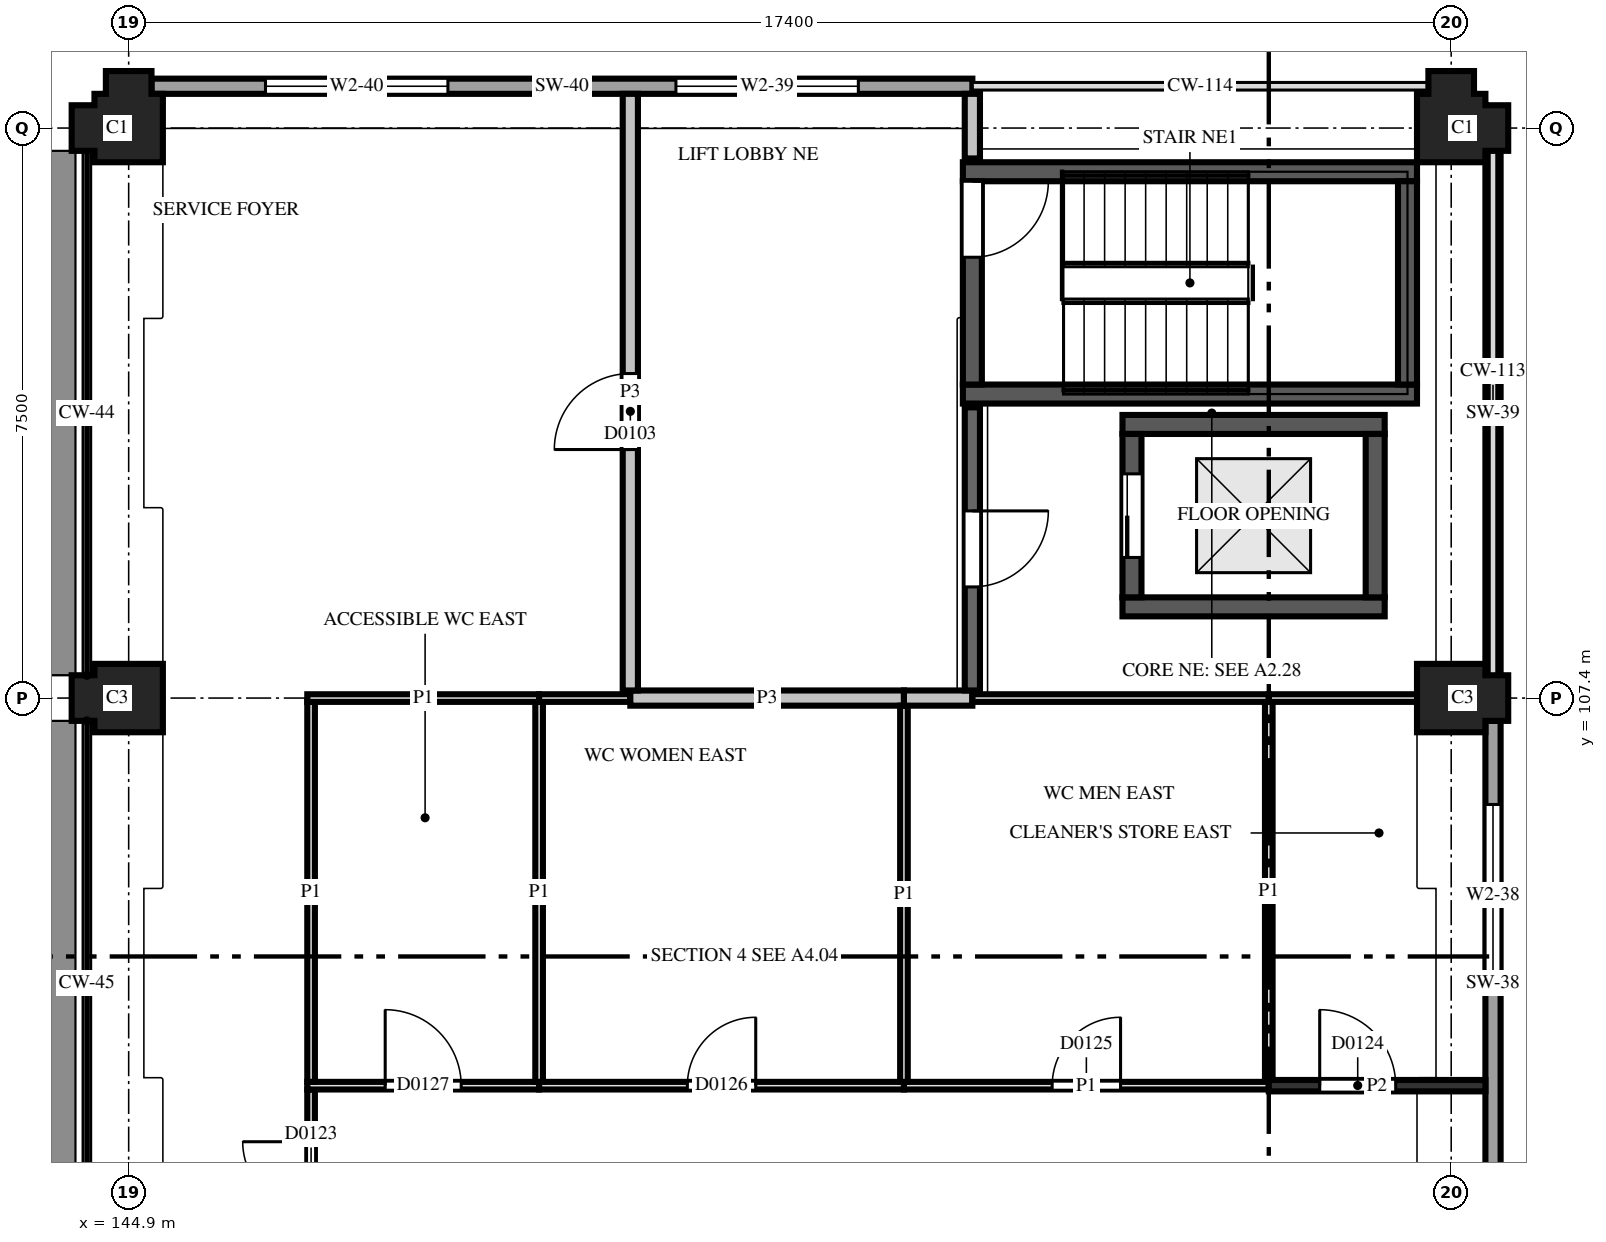
"""IFC4 building model, lengths in metres.
Left out: names, types, materials, properties, quantities, classifications, styles, units other than length and angle.
Written with IfcOpenShell. Run it as: python <this file> out.ifc"""

import sys

from ifc_helpers import new_model, si_unit, direction, frame, frame_2d, origin, place, context, subcontext, project, spatial, polyline, rectangle, outline, extrude, element, fill, save


model = new_model("IFC4")
c1 = context("Model", 3, precision=1e-05, world=origin(), true_north=direction((0.0, 1.0)))
c2 = subcontext(c1, "Body", "Model", "MODEL_VIEW")
j1 = project(units=[si_unit("LENGTHUNIT", "METRE"), si_unit("PLANEANGLEUNIT", "RADIAN")], contexts=[c1])
p1 = place(None, origin())
s1 = spatial("IfcSite", under=j1, at=p1, CompositionType="ELEMENT")
p2 = place(p1, origin())
s2 = spatial("IfcBuilding", under=s1, at=p2, CompositionType="ELEMENT")
p3 = place(p2, frame((0.0, 0.0, 4.5)))
s3 = spatial("IfcBuildingStorey", under=s2, at=p3, CompositionType="ELEMENT", Elevation=4.5)
for number, where, z_axis, x_axis in (
    (1, (144.9, 107.4, 0.0), (0.0, 0.0, 1.0), (-1.0, 0.0, 0.0)),
    (2, (162.3, 107.4, 0.0), (0.0, 0.0, 1.0), (1.0, 0.0, 0.0)),
):
    element("IfcColumn", number, at=place(p3, frame(where, z_axis=z_axis, x_axis=x_axis)), inside=s3, PredefinedType="COLUMN", context=c2, shape_type="SweptSolid", body=[
        extrude(outline(polyline([(-0.45, -0.45), (0.45, -0.45), (0.45, -0.3), (0.75, -0.3), (0.75, 0.3), (0.45, 0.3), (0.45, 0.45), (-0.45, 0.45), (-0.45, -0.45)])), origin(), (0.0, 0.0, 1.0), 3.7),
    ])
for number, where, z_axis, x_axis in (
    (3, (144.9, 114.9, 0.0), (0.0, 0.0, 1.0), (0.0, 1.0, 0.0)),
    (4, (162.3, 114.9, 0.0), (0.0, 0.0, 1.0), (1.0, 0.0, 0.0)),
):
    element("IfcColumn", number, at=place(p3, frame(where, z_axis=z_axis, x_axis=x_axis)), inside=s3, PredefinedType="COLUMN", context=c2, shape_type="SweptSolid", body=[
        extrude(outline(polyline([(-0.45, -0.45), (0.45, -0.45), (0.45, -0.3), (0.75, -0.3), (0.75, 0.3), (0.45, 0.3), (0.45, 0.45), (0.3, 0.45), (0.3, 0.75), (-0.3, 0.75), (-0.3, 0.45), (-0.45, 0.45), (-0.45, -0.45)])), origin(), (0.0, 0.0, 1.0), 3.7),
    ])
for number, where, z_axis, x_axis in (
    (5, (157.975, 108.6, 0.0), (0.0, 0.0, 1.0), (1.0, 0.0, 0.0)),
    (6, (157.975, 111.0, 0.0), (0.0, 0.0, 1.0), (1.0, 0.0, 0.0)),
):
    element("IfcWall", number, at=place(p3, frame(where, z_axis=z_axis, x_axis=x_axis)), inside=s3, PredefinedType="SHEAR", context=c2, shape_type="SweptSolid", body=[
        extrude(rectangle(XDim=3.45, YDim=0.25, at=frame_2d((1.725, 0.0))), origin(), (0.0, 0.0, 1.0), 3.7),
    ])
for number, where, z_axis, x_axis in (
    (7, (155.875, 111.4, 0.0), (0.0, 0.0, 1.0), (1.0, 0.0, 0.0)),
    (8, (155.875, 114.325, 0.0), (0.0, 0.0, 1.0), (1.0, 0.0, 0.0)),
):
    element("IfcWall", number, at=place(p3, frame(where, z_axis=z_axis, x_axis=x_axis)), inside=s3, PredefinedType="SHEAR", context=c2, shape_type="SweptSolid", body=[
        extrude(rectangle(XDim=5.975, YDim=0.25, at=frame_2d((2.988, 0.0))), origin(), (0.0, 0.0, 1.0), 3.7),
    ])
p4 = place(p3, frame((156.0, 111.525, 0.0), z_axis=(0.0, 0.0, 1.0), x_axis=(0.0, 1.0, 0.0)))
e9 = element("IfcWall", 9, at=p4, inside=s3, PredefinedType="SHEAR", context=c2, shape_type="SweptSolid", body=[
    extrude(rectangle(XDim=2.675, YDim=0.25, at=frame_2d((1.337, 0.0))), origin(), (0.0, 0.0, 1.0), 3.7),
])
p5 = place(p4, frame((1.675, 0.0, 0.0)))
e10 = element("IfcOpeningElement", 10, at=p5, cuts=e9, PredefinedType="OPENING", context=c2, shape_type="SweptSolid", body=[
    extrude(rectangle(XDim=1.0, YDim=2.1, at=frame_2d((0.5, 1.05))), frame((0.0, 0.135, 0.0), z_axis=(0.0, -1.0, 0.0), x_axis=(1.0, 0.0, 0.0)), (0.0, 0.0, 1.0), 0.27),
])
p6 = place(p3, frame((158.1, 108.725, 0.0), z_axis=(0.0, 0.0, 1.0), x_axis=(0.0, 1.0, 0.0)))
e11 = element("IfcWall", 11, at=p6, inside=s3, PredefinedType="SHEAR", context=c2, shape_type="SweptSolid", body=[
    extrude(rectangle(XDim=2.15, YDim=0.25, at=frame_2d((1.075, 0.0))), origin(), (0.0, 0.0, 1.0), 3.7),
])
p7 = place(p6, frame((0.525, 0.0, 0.0)))
e12 = element("IfcOpeningElement", 12, at=p7, cuts=e11, PredefinedType="OPENING", context=c2, shape_type="SweptSolid", body=[
    extrude(rectangle(XDim=1.1, YDim=2.1, at=frame_2d((0.55, 1.05))), frame((0.0, 0.135, 0.0), z_axis=(0.0, -1.0, 0.0), x_axis=(1.0, 0.0, 0.0)), (0.0, 0.0, 1.0), 0.27),
])
p8 = place(p3, frame((161.3, 108.725, 0.0), z_axis=(0.0, 0.0, 1.0), x_axis=(0.0, 1.0, 0.0)))
e13 = element("IfcWall", 13, at=p8, inside=s3, PredefinedType="SHEAR", context=c2, shape_type="SweptSolid", body=[
    extrude(rectangle(XDim=2.15, YDim=0.25, at=frame_2d((1.075, 0.0))), origin(), (0.0, 0.0, 1.0), 3.7),
])
p9 = place(p3, frame((161.725, 111.525, 0.0), z_axis=(0.0, 0.0, 1.0), x_axis=(0.0, 1.0, 0.0)))
e14 = element("IfcWall", 14, at=p9, inside=s3, PredefinedType="SHEAR", context=c2, shape_type="SweptSolid", body=[
    extrude(rectangle(XDim=2.675, YDim=0.25, at=frame_2d((1.337, 0.0))), origin(), (0.0, 0.0, 1.0), 3.7),
])
p10 = place(p3, frame((162.85, 100.2, 0.0), z_axis=(0.0, 0.0, 1.0), x_axis=(0.0, 1.0, 0.0)))
e15 = element("IfcWall", 15, at=p10, inside=s3, PredefinedType="SOLIDWALL", context=c2, shape_type="SweptSolid", body=[
    extrude(rectangle(XDim=6.9, YDim=0.2, at=frame_2d((3.45, 0.0))), origin(), (0.0, 0.0, 1.0), 2.3),
])
p11 = place(p10, frame((3.4, 0.0, 0.55)))
e16 = element("IfcOpeningElement", 16, at=p11, cuts=e15, PredefinedType="OPENING", context=c2, shape_type="SweptSolid", body=[
    extrude(rectangle(XDim=2.4, YDim=1.0, at=frame_2d((1.2, 0.5))), frame((0.0, 0.11, 0.0), z_axis=(0.0, -1.0, 0.0), x_axis=(1.0, 0.0, 0.0)), (0.0, 0.0, 1.0), 0.22),
])
p12 = place(p3, frame((162.85, 107.7, 0.0), z_axis=(0.0, 0.0, 1.0), x_axis=(0.0, 1.0, 0.0)))
e17 = element("IfcWall", 17, at=p12, inside=s3, PredefinedType="SOLIDWALL", context=c2, shape_type="SweptSolid", body=[
    extrude(rectangle(XDim=6.9, YDim=0.2, at=frame_2d((3.45, 0.0))), origin(), (0.0, 0.0, 1.0), 2.3),
])
p13 = place(p3, frame((156.0, 115.45, 0.0), z_axis=(0.0, 0.0, 1.0), x_axis=(-1.0, 0.0, 0.0)))
e18 = element("IfcWall", 18, at=p13, inside=s3, PredefinedType="SOLIDWALL", context=c2, shape_type="SweptSolid", body=[
    extrude(rectangle(XDim=10.8, YDim=0.2, at=frame_2d((5.4, 0.0))), origin(), (0.0, 0.0, 1.0), 1.7),
])
p14 = place(p13, frame((1.5, 0.0, 0.55)))
e19 = element("IfcOpeningElement", 19, at=p14, cuts=e18, PredefinedType="OPENING", context=c2, shape_type="SweptSolid", body=[
    extrude(rectangle(XDim=2.4, YDim=1.0, at=frame_2d((1.2, 0.5))), frame((0.0, 0.11, 0.0), z_axis=(0.0, -1.0, 0.0), x_axis=(1.0, 0.0, 0.0)), (0.0, 0.0, 1.0), 0.22),
])
p15 = place(p13, frame((6.9, 0.0, 0.55)))
e20 = element("IfcOpeningElement", 20, at=p15, cuts=e18, PredefinedType="OPENING", context=c2, shape_type="SweptSolid", body=[
    extrude(rectangle(XDim=2.4, YDim=1.0, at=frame_2d((1.2, 0.5))), frame((0.0, 0.11, 0.0), z_axis=(0.0, -1.0, 0.0), x_axis=(1.0, 0.0, 0.0)), (0.0, 0.0, 1.0), 0.22),
])
p16 = place(p3, frame((147.3, 102.25, 0.0), z_axis=(0.0, 0.0, 1.0), x_axis=(0.0, -1.0, 0.0)))
e21 = element("IfcWall", 21, at=p16, inside=s3, PredefinedType="PARTITIONING", context=c2, shape_type="SweptSolid", body=[
    extrude(rectangle(XDim=2.275, YDim=0.1, at=frame_2d((1.137, 0.0))), origin(), (0.0, 0.0, 1.0), 2.88),
])
p17 = place(p16, frame((0.688, 0.0, 0.0)))
e22 = element("IfcOpeningElement", 22, at=p17, cuts=e21, PredefinedType="OPENING", context=c2, shape_type="SweptSolid", body=[
    extrude(rectangle(XDim=0.9, YDim=2.1, at=frame_2d((0.45, 1.05))), frame((0.0, 0.06, 0.0), z_axis=(0.0, -1.0, 0.0), x_axis=(1.0, 0.0, 0.0)), (0.0, 0.0, 1.0), 0.12),
])
p18 = place(p3, frame((150.3, 102.3, 0.0), z_axis=(0.0, 0.0, 1.0), x_axis=(-1.0, 0.0, 0.0)))
e23 = element("IfcWall", 23, at=p18, inside=s3, PredefinedType="PARTITIONING", context=c2, shape_type="SweptSolid", body=[
    extrude(rectangle(XDim=3.05, YDim=0.1, at=frame_2d((1.525, 0.0))), origin(), (0.0, 0.0, 1.0), 2.88),
])
p19 = place(p18, frame((1.025, 0.0, 0.0)))
e24 = element("IfcOpeningElement", 24, at=p19, cuts=e23, PredefinedType="OPENING", context=c2, shape_type="SweptSolid", body=[
    extrude(rectangle(XDim=1.0, YDim=2.1, at=frame_2d((0.5, 1.05))), frame((0.0, 0.06, 0.0), z_axis=(0.0, -1.0, 0.0), x_axis=(1.0, 0.0, 0.0)), (0.0, 0.0, 1.0), 0.12),
])
p20 = place(p3, frame((155.1, 102.3, 0.0), z_axis=(0.0, 0.0, 1.0), x_axis=(-1.0, 0.0, 0.0)))
e25 = element("IfcWall", 25, at=p20, inside=s3, PredefinedType="PARTITIONING", context=c2, shape_type="SweptSolid", body=[
    extrude(rectangle(XDim=4.8, YDim=0.1, at=frame_2d((2.4, 0.0))), origin(), (0.0, 0.0, 1.0), 2.88),
])
p21 = place(p20, frame((1.95, 0.0, 0.0)))
e26 = element("IfcOpeningElement", 26, at=p21, cuts=e25, PredefinedType="OPENING", context=c2, shape_type="SweptSolid", body=[
    extrude(rectangle(XDim=0.9, YDim=2.1, at=frame_2d((0.45, 1.05))), frame((0.0, 0.06, 0.0), z_axis=(0.0, -1.0, 0.0), x_axis=(1.0, 0.0, 0.0)), (0.0, 0.0, 1.0), 0.12),
])
p22 = place(p3, frame((159.9, 102.3, 0.0), z_axis=(0.0, 0.0, 1.0), x_axis=(-1.0, 0.0, 0.0)))
e27 = element("IfcWall", 27, at=p22, inside=s3, PredefinedType="PARTITIONING", context=c2, shape_type="SweptSolid", body=[
    extrude(rectangle(XDim=4.8, YDim=0.1, at=frame_2d((2.4, 0.0))), origin(), (0.0, 0.0, 1.0), 2.88),
])
p23 = place(p22, frame((1.95, 0.0, 0.0)))
e28 = element("IfcOpeningElement", 28, at=p23, cuts=e27, PredefinedType="OPENING", context=c2, shape_type="SweptSolid", body=[
    extrude(rectangle(XDim=0.9, YDim=2.1, at=frame_2d((0.45, 1.05))), frame((0.0, 0.06, 0.0), z_axis=(0.0, -1.0, 0.0), x_axis=(1.0, 0.0, 0.0)), (0.0, 0.0, 1.0), 0.12),
])
p24 = place(p3, frame((162.75, 102.3, 0.0), z_axis=(0.0, 0.0, 1.0), x_axis=(-1.0, 0.0, 0.0)))
e29 = element("IfcWall", 29, at=p24, inside=s3, PredefinedType="PARTITIONING", context=c2, shape_type="SweptSolid", body=[
    extrude(rectangle(XDim=2.85, YDim=0.15, at=frame_2d((1.425, 0.0))), origin(), (0.0, 0.0, 1.0), 2.88),
])
p25 = place(p24, frame((1.18, 0.0, 0.0)))
e30 = element("IfcOpeningElement", 30, at=p25, cuts=e29, PredefinedType="OPENING", context=c2, shape_type="SweptSolid", body=[
    extrude(rectangle(XDim=1.0, YDim=2.1, at=frame_2d((0.5, 1.05))), frame((0.0, 0.085, 0.0), z_axis=(0.0, -1.0, 0.0), x_axis=(1.0, 0.0, 0.0)), (0.0, 0.0, 1.0), 0.17),
])
for number, where, z_axis, x_axis in (
    (31, (147.3, 107.35, 0.0), (0.0, 0.0, 1.0), (0.0, -1.0, 0.0)),
    (32, (150.3, 107.35, 0.0), (0.0, 0.0, 1.0), (0.0, -1.0, 0.0)),
):
    element("IfcWall", number, at=place(p3, frame(where, z_axis=z_axis, x_axis=x_axis)), inside=s3, PredefinedType="PARTITIONING", context=c2, shape_type="SweptSolid", body=[
        extrude(rectangle(XDim=5.0, YDim=0.1, at=frame_2d((2.5, 0.0))), origin(), (0.0, 0.0, 1.0), 2.88),
    ])
p26 = place(p3, frame((150.3, 107.4, 0.0), z_axis=(0.0, 0.0, 1.0), x_axis=(-1.0, 0.0, 0.0)))
e33 = element("IfcWall", 33, at=p26, inside=s3, PredefinedType="PARTITIONING", context=c2, shape_type="SweptSolid", body=[
    extrude(rectangle(XDim=3.05, YDim=0.1, at=frame_2d((1.525, 0.0))), origin(), (0.0, 0.0, 1.0), 2.88),
])
p27 = place(p3, frame((151.5, 107.4, 0.0), z_axis=(0.0, 0.0, 1.0), x_axis=(-1.0, 0.0, 0.0)))
e34 = element("IfcWall", 34, at=p27, inside=s3, PredefinedType="PARTITIONING", context=c2, shape_type="SweptSolid", body=[
    extrude(rectangle(XDim=1.2, YDim=0.1, at=frame_2d((0.6, 0.0))), origin(), (0.0, 0.0, 1.0), 2.88),
])
p28 = place(p3, frame((151.5, 107.4, 0.0), z_axis=(0.0, 0.0, 1.0), x_axis=(1.0, 0.0, 0.0)))
e35 = element("IfcWall", 35, at=p28, inside=s3, PredefinedType="PARTITIONING", context=c2, shape_type="SweptSolid", body=[
    extrude(rectangle(XDim=3.6, YDim=0.2, at=frame_2d((1.8, 0.0))), origin(), (0.0, 0.0, 1.0), 2.88),
])
p29 = place(p3, frame((155.1, 107.3, 0.0), z_axis=(0.0, 0.0, 1.0), x_axis=(0.0, -1.0, 0.0)))
e36 = element("IfcWall", 36, at=p29, inside=s3, PredefinedType="PARTITIONING", context=c2, shape_type="SweptSolid", body=[
    extrude(rectangle(XDim=4.95, YDim=0.1, at=frame_2d((2.475, 0.0))), origin(), (0.0, 0.0, 1.0), 2.88),
])
p30 = place(p3, frame((155.1, 107.4, 0.0), z_axis=(0.0, 0.0, 1.0), x_axis=(1.0, 0.0, 0.0)))
e37 = element("IfcWall", 37, at=p30, inside=s3, PredefinedType="PARTITIONING", context=c2, shape_type="SweptSolid", body=[
    extrude(rectangle(XDim=0.9, YDim=0.2, at=frame_2d((0.45, 0.0))), origin(), (0.0, 0.0, 1.0), 2.88),
])
p31 = place(p3, frame((156.0, 107.5, 0.0), z_axis=(0.0, 0.0, 1.0), x_axis=(0.0, 1.0, 0.0)))
e38 = element("IfcWall", 38, at=p31, inside=s3, PredefinedType="PARTITIONING", context=c2, shape_type="SweptSolid", body=[
    extrude(rectangle(XDim=3.725, YDim=0.2, at=frame_2d((1.863, 0.0))), origin(), (0.0, 0.0, 1.0), 2.88),
])
p32 = place(p31, frame((1.363, 0.0, 0.0)))
e39 = element("IfcOpeningElement", 39, at=p32, cuts=e38, PredefinedType="OPENING", context=c2, shape_type="SweptSolid", body=[
    extrude(rectangle(XDim=1.0, YDim=2.1, at=frame_2d((0.5, 1.05))), frame((0.0, 0.11, 0.0), z_axis=(0.0, -1.0, 0.0), x_axis=(1.0, 0.0, 0.0)), (0.0, 0.0, 1.0), 0.22),
])
p33 = place(p3, frame((159.9, 107.35, 0.0), z_axis=(0.0, 0.0, 1.0), x_axis=(0.0, -1.0, 0.0)))
e40 = element("IfcWall", 40, at=p33, inside=s3, PredefinedType="PARTITIONING", context=c2, shape_type="SweptSolid", body=[
    extrude(rectangle(XDim=4.975, YDim=0.1, at=frame_2d((2.488, 0.0))), origin(), (0.0, 0.0, 1.0), 2.88),
])
p34 = place(p3, frame((159.9, 107.4, 0.0), z_axis=(0.0, 0.0, 1.0), x_axis=(-1.0, 0.0, 0.0)))
e41 = element("IfcWall", 41, at=p34, inside=s3, PredefinedType="PARTITIONING", context=c2, shape_type="SweptSolid", body=[
    extrude(rectangle(XDim=3.9, YDim=0.1, at=frame_2d((1.95, 0.0))), origin(), (0.0, 0.0, 1.0), 2.88),
])
p35 = place(p3, frame((162.24, 107.4, 0.0), z_axis=(0.0, 0.0, 1.0), x_axis=(-1.0, 0.0, 0.0)))
e42 = element("IfcWall", 42, at=p35, inside=s3, PredefinedType="PARTITIONING", context=c2, shape_type="SweptSolid", body=[
    extrude(rectangle(XDim=2.34, YDim=0.1, at=frame_2d((1.17, 0.0))), origin(), (0.0, 0.0, 1.0), 2.88),
])
p36 = place(p3, frame((156.0, 114.5, 0.0), z_axis=(0.0, 0.0, 1.0), x_axis=(0.0, 1.0, 0.0)))
e43 = element("IfcWall", 43, at=p36, inside=s3, PredefinedType="PARTITIONING", context=c2, shape_type="SweptSolid", body=[
    extrude(rectangle(XDim=0.85, YDim=0.2, at=frame_2d((0.425, 0.0))), origin(), (0.0, 0.0, 1.0), 2.88),
])
p37 = place(p3, frame((151.5, 115.35, 0.0), z_axis=(0.0, 0.0, 1.0), x_axis=(0.0, -1.0, 0.0)))
e44 = element("IfcWall", 44, at=p37, inside=s3, PredefinedType="PARTITIONING", context=c2, shape_type="SweptSolid", body=[
    extrude(rectangle(XDim=7.85, YDim=0.2, at=frame_2d((3.925, 0.0))), origin(), (0.0, 0.0, 1.0), 2.88),
])
p38 = place(p37, frame((3.68, 0.0, 0.0)))
e45 = element("IfcOpeningElement", 45, at=p38, cuts=e44, PredefinedType="OPENING", context=c2, shape_type="SweptSolid", body=[
    extrude(rectangle(XDim=1.0, YDim=2.1, at=frame_2d((0.5, 1.05))), frame((0.0, 0.11, 0.0), z_axis=(0.0, -1.0, 0.0), x_axis=(1.0, 0.0, 0.0)), (0.0, 0.0, 1.0), 0.22),
])
p39 = place(p11, origin())
e46 = element("IfcWindow", 46, at=p39, inside=s3, PartitioningType="SINGLE_PANEL", PredefinedType="WINDOW", context=c2, shape_type="SweptSolid", body=[
    extrude(rectangle(XDim=2.4, YDim=1.0, at=frame_2d((1.2, 0.5))), frame((0.0, 0.03, 0.0), z_axis=(0.0, -1.0, 0.0), x_axis=(1.0, 0.0, 0.0)), (0.0, 0.0, 1.0), 0.06),
])
fill(e16, e46)
p40 = place(p14, origin())
e47 = element("IfcWindow", 47, at=p40, inside=s3, PartitioningType="SINGLE_PANEL", PredefinedType="WINDOW", context=c2, shape_type="SweptSolid", body=[
    extrude(rectangle(XDim=2.4, YDim=1.0, at=frame_2d((1.2, 0.5))), frame((0.0, 0.03, 0.0), z_axis=(0.0, -1.0, 0.0), x_axis=(1.0, 0.0, 0.0)), (0.0, 0.0, 1.0), 0.06),
])
fill(e19, e47)
p41 = place(p15, origin())
e48 = element("IfcWindow", 48, at=p41, inside=s3, PartitioningType="SINGLE_PANEL", PredefinedType="WINDOW", context=c2, shape_type="SweptSolid", body=[
    extrude(rectangle(XDim=2.4, YDim=1.0, at=frame_2d((1.2, 0.5))), frame((0.0, 0.03, 0.0), z_axis=(0.0, -1.0, 0.0), x_axis=(1.0, 0.0, 0.0)), (0.0, 0.0, 1.0), 0.06),
])
fill(e20, e48)
p42 = place(p38, origin())
e49 = element("IfcDoor", 49, at=p42, inside=s3, OperationType="SINGLE_SWING_RIGHT", PredefinedType="DOOR", context=c2, shape_type="SweptSolid", body=[
    extrude(rectangle(XDim=1.0, YDim=2.1, at=frame_2d((0.5, 1.05))), frame((0.0, 0.025, 0.0), z_axis=(0.0, -1.0, 0.0), x_axis=(1.0, 0.0, 0.0)), (0.0, 0.0, 1.0), 0.05),
])
fill(e45, e49)
p43 = place(p17, origin())
e50 = element("IfcDoor", 50, at=p43, inside=s3, OperationType="SINGLE_SWING_LEFT", PredefinedType="DOOR", context=c2, shape_type="SweptSolid", body=[
    extrude(rectangle(XDim=0.9, YDim=2.1, at=frame_2d((0.45, 1.05))), frame((0.0, 0.025, 0.0), z_axis=(0.0, -1.0, 0.0), x_axis=(1.0, 0.0, 0.0)), (0.0, 0.0, 1.0), 0.05),
])
fill(e22, e50)
p44 = place(p25, origin())
e51 = element("IfcDoor", 51, at=p44, inside=s3, OperationType="SINGLE_SWING_RIGHT", PredefinedType="DOOR", context=c2, shape_type="SweptSolid", body=[
    extrude(rectangle(XDim=1.0, YDim=2.1, at=frame_2d((0.5, 1.05))), frame((0.0, 0.025, 0.0), z_axis=(0.0, -1.0, 0.0), x_axis=(1.0, 0.0, 0.0)), (0.0, 0.0, 1.0), 0.05),
])
fill(e30, e51)
p45 = place(p23, origin())
e52 = element("IfcDoor", 52, at=p45, inside=s3, OperationType="SINGLE_SWING_LEFT", PredefinedType="DOOR", context=c2, shape_type="SweptSolid", body=[
    extrude(rectangle(XDim=0.9, YDim=2.1, at=frame_2d((0.45, 1.05))), frame((0.0, 0.025, 0.0), z_axis=(0.0, -1.0, 0.0), x_axis=(1.0, 0.0, 0.0)), (0.0, 0.0, 1.0), 0.05),
])
fill(e28, e52)
p46 = place(p21, origin())
e53 = element("IfcDoor", 53, at=p46, inside=s3, OperationType="SINGLE_SWING_LEFT", PredefinedType="DOOR", context=c2, shape_type="SweptSolid", body=[
    extrude(rectangle(XDim=0.9, YDim=2.1, at=frame_2d((0.45, 1.05))), frame((0.0, 0.025, 0.0), z_axis=(0.0, -1.0, 0.0), x_axis=(1.0, 0.0, 0.0)), (0.0, 0.0, 1.0), 0.05),
])
fill(e26, e53)
p47 = place(p19, origin())
e54 = element("IfcDoor", 54, at=p47, inside=s3, OperationType="SINGLE_SWING_RIGHT", PredefinedType="DOOR", context=c2, shape_type="SweptSolid", body=[
    extrude(rectangle(XDim=1.0, YDim=2.1, at=frame_2d((0.5, 1.05))), frame((0.0, 0.025, 0.0), z_axis=(0.0, -1.0, 0.0), x_axis=(1.0, 0.0, 0.0)), (0.0, 0.0, 1.0), 0.05),
])
fill(e24, e54)
p48 = place(p7, origin())
e55 = element("IfcDoor", 55, at=p48, inside=s3, OperationType="SLIDING_TO_LEFT", PredefinedType="DOOR", context=c2, shape_type="SweptSolid", body=[
    extrude(rectangle(XDim=1.1, YDim=2.1, at=frame_2d((0.55, 1.05))), frame((0.0, 0.025, 0.0), z_axis=(0.0, -1.0, 0.0), x_axis=(1.0, 0.0, 0.0)), (0.0, 0.0, 1.0), 0.05),
])
fill(e12, e55)
p49 = place(p5, origin())
e56 = element("IfcDoor", 56, at=p49, inside=s3, OperationType="SINGLE_SWING_RIGHT", PredefinedType="DOOR", context=c2, shape_type="SweptSolid", body=[
    extrude(rectangle(XDim=1.0, YDim=2.1, at=frame_2d((0.5, 1.05))), frame((0.0, 0.025, 0.0), z_axis=(0.0, -1.0, 0.0), x_axis=(1.0, 0.0, 0.0)), (0.0, 0.0, 1.0), 0.05),
])
fill(e10, e56)
p50 = place(p32, origin())
e57 = element("IfcDoor", 57, at=p50, inside=s3, OperationType="SINGLE_SWING_RIGHT", PredefinedType="DOOR", context=c2, shape_type="SweptSolid", body=[
    extrude(rectangle(XDim=1.0, YDim=2.1, at=frame_2d((0.5, 1.05))), frame((0.0, 0.025, 0.0), z_axis=(0.0, -1.0, 0.0), x_axis=(1.0, 0.0, 0.0)), (0.0, 0.0, 1.0), 0.05),
])
fill(e39, e57)
save(model, sys.argv[1])
